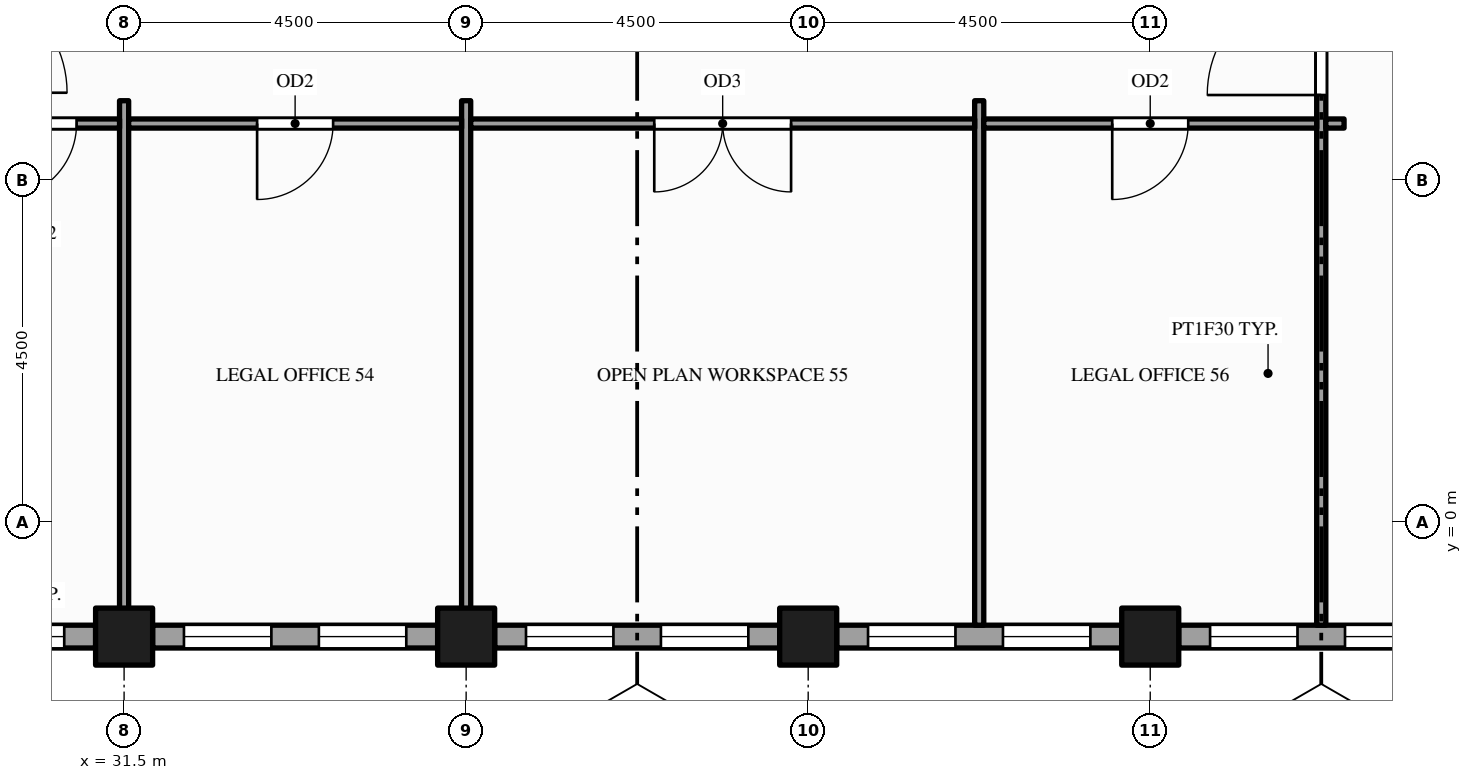
"""IFC4 building model, lengths in metres.
Left out: names, types, materials, properties, quantities, classifications, styles, units other than length and angle.
Written with IfcOpenShell. Run it as: python <this file> out.ifc"""

import sys

from ifc_helpers import new_model, si_unit, direction, frame, frame_2d, origin, origin_2d, place, context, subcontext, project, spatial, rectangle, hollow_rectangle, extrude, element, fill, save


model = new_model("IFC4")
c1 = context("Model", 3, precision=1e-05, world=origin(), true_north=direction((0.0, 1.0)))
c2 = subcontext(c1, "Body", "Model", "MODEL_VIEW")
j1 = project(units=[si_unit("LENGTHUNIT", "METRE"), si_unit("PLANEANGLEUNIT", "RADIAN")], contexts=[c1])
p1 = place(None, origin())
s1 = spatial("IfcSite", under=j1, at=p1, CompositionType="ELEMENT")
p2 = place(p1, origin())
s2 = spatial("IfcBuilding", under=s1, at=p2, CompositionType="ELEMENT")
p3 = place(p2, frame((0.0, 0.0, 211.0)))
s3 = spatial("IfcBuildingStorey", under=s2, at=p3, CompositionType="ELEMENT", Elevation=211.0)
for number, where, z_axis, x_axis in (
    (1, (31.5, -1.5, -0.15), (0.0, 0.0, 1.0), (1.0, 0.0, 0.0)),
    (2, (36.0, -1.5, -0.15), (0.0, 0.0, 1.0), (1.0, 0.0, 0.0)),
    (3, (40.5, -1.5, -0.15), (0.0, 0.0, 1.0), (1.0, 0.0, 0.0)),
    (4, (45.0, -1.5, -0.15), (0.0, 0.0, 1.0), (1.0, 0.0, 0.0)),
):
    element("IfcColumn", number, at=place(p3, frame(where, z_axis=z_axis, x_axis=x_axis)), inside=s3, PredefinedType="COLUMN", context=c2, shape_type="SweptSolid", body=[
        extrude(hollow_rectangle(XDim=0.75, YDim=0.75, WallThickness=0.036, at=origin_2d()), origin(), (0.0, 0.0, 1.0), 4.0),
    ])
p4 = place(p3, frame((27.375, -1.5, 0.0), z_axis=(0.0, 0.0, 1.0), x_axis=(1.0, 0.0, 0.0)))
e5 = element("IfcWall", 5, at=p4, inside=s3, PredefinedType="STANDARD", context=c2, shape_type="SweptSolid", body=[
    extrude(rectangle(XDim=3.75, YDim=0.3, at=frame_2d((1.875, 0.0))), origin(), (0.0, 0.0, 1.0), 2.87),
])
p5 = place(p4, frame((0.413, 0.0, 0.9)))
e6 = element("IfcOpeningElement", 6, at=p5, cuts=e5, PredefinedType="OPENING", context=c2, shape_type="SweptSolid", body=[
    extrude(rectangle(XDim=1.15, YDim=1.75, at=frame_2d((0.575, 0.875))), frame((0.0, 0.16, 0.0), z_axis=(0.0, -1.0, 0.0), x_axis=(1.0, 0.0, 0.0)), (0.0, 0.0, 1.0), 0.32),
])
p6 = place(p4, frame((2.188, 0.0, 0.9)))
e7 = element("IfcOpeningElement", 7, at=p6, cuts=e5, PredefinedType="OPENING", context=c2, shape_type="SweptSolid", body=[
    extrude(rectangle(XDim=1.15, YDim=1.75, at=frame_2d((0.575, 0.875))), frame((0.0, 0.16, 0.0), z_axis=(0.0, -1.0, 0.0), x_axis=(1.0, 0.0, 0.0)), (0.0, 0.0, 1.0), 0.32),
])
p7 = place(p3, frame((31.875, -1.5, 0.0), z_axis=(0.0, 0.0, 1.0), x_axis=(1.0, 0.0, 0.0)))
e8 = element("IfcWall", 8, at=p7, inside=s3, PredefinedType="STANDARD", context=c2, shape_type="SweptSolid", body=[
    extrude(rectangle(XDim=3.75, YDim=0.3, at=frame_2d((1.875, 0.0))), origin(), (0.0, 0.0, 1.0), 2.87),
])
p8 = place(p7, frame((0.413, 0.0, 0.9)))
e9 = element("IfcOpeningElement", 9, at=p8, cuts=e8, PredefinedType="OPENING", context=c2, shape_type="SweptSolid", body=[
    extrude(rectangle(XDim=1.15, YDim=1.75, at=frame_2d((0.575, 0.875))), frame((0.0, 0.16, 0.0), z_axis=(0.0, -1.0, 0.0), x_axis=(1.0, 0.0, 0.0)), (0.0, 0.0, 1.0), 0.32),
])
p9 = place(p7, frame((2.188, 0.0, 0.9)))
e10 = element("IfcOpeningElement", 10, at=p9, cuts=e8, PredefinedType="OPENING", context=c2, shape_type="SweptSolid", body=[
    extrude(rectangle(XDim=1.15, YDim=1.75, at=frame_2d((0.575, 0.875))), frame((0.0, 0.16, 0.0), z_axis=(0.0, -1.0, 0.0), x_axis=(1.0, 0.0, 0.0)), (0.0, 0.0, 1.0), 0.32),
])
p10 = place(p3, frame((36.375, -1.5, 0.0), z_axis=(0.0, 0.0, 1.0), x_axis=(1.0, 0.0, 0.0)))
e11 = element("IfcWall", 11, at=p10, inside=s3, PredefinedType="STANDARD", context=c2, shape_type="SweptSolid", body=[
    extrude(rectangle(XDim=3.75, YDim=0.3, at=frame_2d((1.875, 0.0))), origin(), (0.0, 0.0, 1.0), 2.87),
])
p11 = place(p10, frame((0.413, 0.0, 0.9)))
e12 = element("IfcOpeningElement", 12, at=p11, cuts=e11, PredefinedType="OPENING", context=c2, shape_type="SweptSolid", body=[
    extrude(rectangle(XDim=1.15, YDim=1.75, at=frame_2d((0.575, 0.875))), frame((0.0, 0.16, 0.0), z_axis=(0.0, -1.0, 0.0), x_axis=(1.0, 0.0, 0.0)), (0.0, 0.0, 1.0), 0.32),
])
p12 = place(p10, frame((2.188, 0.0, 0.9)))
e13 = element("IfcOpeningElement", 13, at=p12, cuts=e11, PredefinedType="OPENING", context=c2, shape_type="SweptSolid", body=[
    extrude(rectangle(XDim=1.15, YDim=1.75, at=frame_2d((0.575, 0.875))), frame((0.0, 0.16, 0.0), z_axis=(0.0, -1.0, 0.0), x_axis=(1.0, 0.0, 0.0)), (0.0, 0.0, 1.0), 0.32),
])
p13 = place(p3, frame((40.875, -1.5, 0.0), z_axis=(0.0, 0.0, 1.0), x_axis=(1.0, 0.0, 0.0)))
e14 = element("IfcWall", 14, at=p13, inside=s3, PredefinedType="STANDARD", context=c2, shape_type="SweptSolid", body=[
    extrude(rectangle(XDim=3.75, YDim=0.3, at=frame_2d((1.875, 0.0))), origin(), (0.0, 0.0, 1.0), 2.87),
])
p14 = place(p13, frame((0.413, 0.0, 0.9)))
e15 = element("IfcOpeningElement", 15, at=p14, cuts=e14, PredefinedType="OPENING", context=c2, shape_type="SweptSolid", body=[
    extrude(rectangle(XDim=1.15, YDim=1.75, at=frame_2d((0.575, 0.875))), frame((0.0, 0.16, 0.0), z_axis=(0.0, -1.0, 0.0), x_axis=(1.0, 0.0, 0.0)), (0.0, 0.0, 1.0), 0.32),
])
p15 = place(p13, frame((2.188, 0.0, 0.9)))
e16 = element("IfcOpeningElement", 16, at=p15, cuts=e14, PredefinedType="OPENING", context=c2, shape_type="SweptSolid", body=[
    extrude(rectangle(XDim=1.15, YDim=1.75, at=frame_2d((0.575, 0.875))), frame((0.0, 0.16, 0.0), z_axis=(0.0, -1.0, 0.0), x_axis=(1.0, 0.0, 0.0)), (0.0, 0.0, 1.0), 0.32),
])
p16 = place(p3, frame((45.375, -1.5, 0.0), z_axis=(0.0, 0.0, 1.0), x_axis=(1.0, 0.0, 0.0)))
e17 = element("IfcWall", 17, at=p16, inside=s3, PredefinedType="STANDARD", context=c2, shape_type="SweptSolid", body=[
    extrude(rectangle(XDim=3.75, YDim=0.3, at=frame_2d((1.875, 0.0))), origin(), (0.0, 0.0, 1.0), 2.87),
])
p17 = place(p16, frame((0.413, 0.0, 0.9)))
e18 = element("IfcOpeningElement", 18, at=p17, cuts=e17, PredefinedType="OPENING", context=c2, shape_type="SweptSolid", body=[
    extrude(rectangle(XDim=1.15, YDim=1.75, at=frame_2d((0.575, 0.875))), frame((0.0, 0.16, 0.0), z_axis=(0.0, -1.0, 0.0), x_axis=(1.0, 0.0, 0.0)), (0.0, 0.0, 1.0), 0.32),
])
p18 = place(p16, frame((2.188, 0.0, 0.9)))
e19 = element("IfcOpeningElement", 19, at=p18, cuts=e17, PredefinedType="OPENING", context=c2, shape_type="SweptSolid", body=[
    extrude(rectangle(XDim=1.15, YDim=1.75, at=frame_2d((0.575, 0.875))), frame((0.0, 0.16, 0.0), z_axis=(0.0, -1.0, 0.0), x_axis=(1.0, 0.0, 0.0)), (0.0, 0.0, 1.0), 0.32),
])
for number, where, z_axis, x_axis in (
    (20, (31.5, -1.35, 0.0), (0.0, 0.0, 1.0), (0.0, 1.0, 0.0)),
    (21, (36.0, -1.35, 0.0), (0.0, 0.0, 1.0), (0.0, 1.0, 0.0)),
    (22, (42.75, -1.35, 0.0), (0.0, 0.0, 1.0), (0.0, 1.0, 0.0)),
):
    element("IfcWall", number, at=place(p3, frame(where, z_axis=z_axis, x_axis=x_axis)), inside=s3, PredefinedType="PARTITIONING", context=c2, shape_type="SweptSolid", body=[
        extrude(rectangle(XDim=6.9, YDim=0.12, at=frame_2d((3.45, 0.0))), origin(), (0.0, 0.0, 1.0), 2.87),
    ])
p19 = place(p3, frame((47.25, -1.35, 0.0), z_axis=(0.0, 0.0, 1.0), x_axis=(0.0, 1.0, 0.0)))
e23 = element("IfcWall", 23, at=p19, inside=s3, PredefinedType="PARTITIONING", context=c2, shape_type="SweptSolid", body=[
    extrude(rectangle(XDim=22.2, YDim=0.12, at=frame_2d((11.1, 0.0))), origin(), (0.0, 0.0, 1.0), 2.87),
])
p20 = place(p19, frame((6.975, 0.0, 0.0)))
e24 = element("IfcOpeningElement", 24, at=p20, cuts=e23, PredefinedType="OPENING", context=c2, shape_type="SweptSolid", body=[
    extrude(rectangle(XDim=1.5, YDim=2.1, at=frame_2d((0.75, 1.05))), frame((0.0, 0.07, 0.0), z_axis=(0.0, -1.0, 0.0), x_axis=(1.0, 0.0, 0.0)), (0.0, 0.0, 1.0), 0.14),
])
p21 = place(p19, frame((13.725, 0.0, 0.0)))
e25 = element("IfcOpeningElement", 25, at=p21, cuts=e23, PredefinedType="OPENING", context=c2, shape_type="SweptSolid", body=[
    extrude(rectangle(XDim=1.5, YDim=2.1, at=frame_2d((0.75, 1.05))), frame((0.0, 0.07, 0.0), z_axis=(0.0, -1.0, 0.0), x_axis=(1.0, 0.0, 0.0)), (0.0, 0.0, 1.0), 0.14),
])
p22 = place(p19, frame((9.29, 0.0, 0.0)))
e26 = element("IfcOpeningElement", 26, at=p22, cuts=e23, PredefinedType="OPENING", context=c2, shape_type="SweptSolid", body=[
    extrude(rectangle(XDim=0.9, YDim=2.1, at=frame_2d((0.45, 1.05))), frame((0.0, 0.07, 0.0), z_axis=(0.0, -1.0, 0.0), x_axis=(1.0, 0.0, 0.0)), (0.0, 0.0, 1.0), 0.14),
])
p23 = place(p19, frame((10.65, 0.0, 0.0)))
e27 = element("IfcOpeningElement", 27, at=p23, cuts=e23, PredefinedType="OPENING", context=c2, shape_type="SweptSolid", body=[
    extrude(rectangle(XDim=0.9, YDim=2.1, at=frame_2d((0.45, 1.05))), frame((0.0, 0.07, 0.0), z_axis=(0.0, -1.0, 0.0), x_axis=(1.0, 0.0, 0.0)), (0.0, 0.0, 1.0), 0.14),
])
p24 = place(p19, frame((12.01, 0.0, 0.0)))
e28 = element("IfcOpeningElement", 28, at=p24, cuts=e23, PredefinedType="OPENING", context=c2, shape_type="SweptSolid", body=[
    extrude(rectangle(XDim=1.0, YDim=2.1, at=frame_2d((0.5, 1.05))), frame((0.0, 0.07, 0.0), z_axis=(0.0, -1.0, 0.0), x_axis=(1.0, 0.0, 0.0)), (0.0, 0.0, 1.0), 0.14),
])
p25 = place(p3, frame((29.31, 5.25, 0.0), z_axis=(0.0, 0.0, 1.0), x_axis=(1.0, 0.0, 0.0)))
e29 = element("IfcWall", 29, at=p25, inside=s3, PredefinedType="PARTITIONING", context=c2, shape_type="SweptSolid", body=[
    extrude(rectangle(XDim=2.13, YDim=0.12, at=frame_2d((1.065, 0.0))), origin(), (0.0, 0.0, 1.0), 2.87),
])
p26 = place(p25, frame((0.565, 0.0, 0.0)))
e30 = element("IfcOpeningElement", 30, at=p26, cuts=e29, PredefinedType="OPENING", context=c2, shape_type="SweptSolid", body=[
    extrude(rectangle(XDim=1.0, YDim=2.1, at=frame_2d((0.5, 1.05))), frame((0.0, 0.07, 0.0), z_axis=(0.0, -1.0, 0.0), x_axis=(1.0, 0.0, 0.0)), (0.0, 0.0, 1.0), 0.14),
])
p27 = place(p3, frame((31.56, 5.25, 0.0), z_axis=(0.0, 0.0, 1.0), x_axis=(1.0, 0.0, 0.0)))
e31 = element("IfcWall", 31, at=p27, inside=s3, PredefinedType="PARTITIONING", context=c2, shape_type="SweptSolid", body=[
    extrude(rectangle(XDim=4.38, YDim=0.12, at=frame_2d((2.19, 0.0))), origin(), (0.0, 0.0, 1.0), 2.87),
])
p28 = place(p27, frame((1.69, 0.0, 0.0)))
e32 = element("IfcOpeningElement", 32, at=p28, cuts=e31, PredefinedType="OPENING", context=c2, shape_type="SweptSolid", body=[
    extrude(rectangle(XDim=1.0, YDim=2.1, at=frame_2d((0.5, 1.05))), frame((0.0, 0.07, 0.0), z_axis=(0.0, -1.0, 0.0), x_axis=(1.0, 0.0, 0.0)), (0.0, 0.0, 1.0), 0.14),
])
p29 = place(p3, frame((36.06, 5.25, 0.0), z_axis=(0.0, 0.0, 1.0), x_axis=(1.0, 0.0, 0.0)))
e33 = element("IfcWall", 33, at=p29, inside=s3, PredefinedType="PARTITIONING", context=c2, shape_type="SweptSolid", body=[
    extrude(rectangle(XDim=6.63, YDim=0.12, at=frame_2d((3.315, 0.0))), origin(), (0.0, 0.0, 1.0), 2.87),
])
p30 = place(p29, frame((2.415, 0.0, 0.0)))
e34 = element("IfcOpeningElement", 34, at=p30, cuts=e33, PredefinedType="OPENING", context=c2, shape_type="SweptSolid", body=[
    extrude(rectangle(XDim=1.8, YDim=2.1, at=frame_2d((0.9, 1.05))), frame((0.0, 0.07, 0.0), z_axis=(0.0, -1.0, 0.0), x_axis=(1.0, 0.0, 0.0)), (0.0, 0.0, 1.0), 0.14),
])
p31 = place(p3, frame((42.81, 5.25, 0.0), z_axis=(0.0, 0.0, 1.0), x_axis=(1.0, 0.0, 0.0)))
e35 = element("IfcWall", 35, at=p31, inside=s3, PredefinedType="PARTITIONING", context=c2, shape_type="SweptSolid", body=[
    extrude(rectangle(XDim=4.38, YDim=0.12, at=frame_2d((2.19, 0.0))), origin(), (0.0, 0.0, 1.0), 2.87),
])
p32 = place(p31, frame((1.69, 0.0, 0.0)))
e36 = element("IfcOpeningElement", 36, at=p32, cuts=e35, PredefinedType="OPENING", context=c2, shape_type="SweptSolid", body=[
    extrude(rectangle(XDim=1.0, YDim=2.1, at=frame_2d((0.5, 1.05))), frame((0.0, 0.07, 0.0), z_axis=(0.0, -1.0, 0.0), x_axis=(1.0, 0.0, 0.0)), (0.0, 0.0, 1.0), 0.14),
])
p33 = place(p3, frame((47.31, 5.25, 0.0), z_axis=(0.0, 0.0, 1.0), x_axis=(1.0, 0.0, 0.0)))
e37 = element("IfcWall", 37, at=p33, inside=s3, PredefinedType="PARTITIONING", context=c2, shape_type="SweptSolid", body=[
    extrude(rectangle(XDim=0.24, YDim=0.12, at=frame_2d((0.12, 0.0))), origin(), (0.0, 0.0, 1.0), 2.87),
])
p34 = place(p6, origin())
e38 = element("IfcWindow", 38, at=p34, inside=s3, PartitioningType="SINGLE_PANEL", PredefinedType="WINDOW", context=c2, shape_type="SweptSolid", body=[
    extrude(rectangle(XDim=1.15, YDim=1.75, at=frame_2d((0.575, 0.875))), frame((0.0, 0.03, 0.0), z_axis=(0.0, -1.0, 0.0), x_axis=(1.0, 0.0, 0.0)), (0.0, 0.0, 1.0), 0.06),
])
fill(e7, e38)
p35 = place(p8, origin())
e39 = element("IfcWindow", 39, at=p35, inside=s3, PartitioningType="SINGLE_PANEL", PredefinedType="WINDOW", context=c2, shape_type="SweptSolid", body=[
    extrude(rectangle(XDim=1.15, YDim=1.75, at=frame_2d((0.575, 0.875))), frame((0.0, 0.03, 0.0), z_axis=(0.0, -1.0, 0.0), x_axis=(1.0, 0.0, 0.0)), (0.0, 0.0, 1.0), 0.06),
])
fill(e9, e39)
p36 = place(p9, origin())
e40 = element("IfcWindow", 40, at=p36, inside=s3, PartitioningType="SINGLE_PANEL", PredefinedType="WINDOW", context=c2, shape_type="SweptSolid", body=[
    extrude(rectangle(XDim=1.15, YDim=1.75, at=frame_2d((0.575, 0.875))), frame((0.0, 0.03, 0.0), z_axis=(0.0, -1.0, 0.0), x_axis=(1.0, 0.0, 0.0)), (0.0, 0.0, 1.0), 0.06),
])
fill(e10, e40)
p37 = place(p11, origin())
e41 = element("IfcWindow", 41, at=p37, inside=s3, PartitioningType="SINGLE_PANEL", PredefinedType="WINDOW", context=c2, shape_type="SweptSolid", body=[
    extrude(rectangle(XDim=1.15, YDim=1.75, at=frame_2d((0.575, 0.875))), frame((0.0, 0.03, 0.0), z_axis=(0.0, -1.0, 0.0), x_axis=(1.0, 0.0, 0.0)), (0.0, 0.0, 1.0), 0.06),
])
fill(e12, e41)
p38 = place(p12, origin())
e42 = element("IfcWindow", 42, at=p38, inside=s3, PartitioningType="SINGLE_PANEL", PredefinedType="WINDOW", context=c2, shape_type="SweptSolid", body=[
    extrude(rectangle(XDim=1.15, YDim=1.75, at=frame_2d((0.575, 0.875))), frame((0.0, 0.03, 0.0), z_axis=(0.0, -1.0, 0.0), x_axis=(1.0, 0.0, 0.0)), (0.0, 0.0, 1.0), 0.06),
])
fill(e13, e42)
p39 = place(p14, origin())
e43 = element("IfcWindow", 43, at=p39, inside=s3, PartitioningType="SINGLE_PANEL", PredefinedType="WINDOW", context=c2, shape_type="SweptSolid", body=[
    extrude(rectangle(XDim=1.15, YDim=1.75, at=frame_2d((0.575, 0.875))), frame((0.0, 0.03, 0.0), z_axis=(0.0, -1.0, 0.0), x_axis=(1.0, 0.0, 0.0)), (0.0, 0.0, 1.0), 0.06),
])
fill(e15, e43)
p40 = place(p15, origin())
e44 = element("IfcWindow", 44, at=p40, inside=s3, PartitioningType="SINGLE_PANEL", PredefinedType="WINDOW", context=c2, shape_type="SweptSolid", body=[
    extrude(rectangle(XDim=1.15, YDim=1.75, at=frame_2d((0.575, 0.875))), frame((0.0, 0.03, 0.0), z_axis=(0.0, -1.0, 0.0), x_axis=(1.0, 0.0, 0.0)), (0.0, 0.0, 1.0), 0.06),
])
fill(e16, e44)
p41 = place(p17, origin())
e45 = element("IfcWindow", 45, at=p41, inside=s3, PartitioningType="SINGLE_PANEL", PredefinedType="WINDOW", context=c2, shape_type="SweptSolid", body=[
    extrude(rectangle(XDim=1.15, YDim=1.75, at=frame_2d((0.575, 0.875))), frame((0.0, 0.03, 0.0), z_axis=(0.0, -1.0, 0.0), x_axis=(1.0, 0.0, 0.0)), (0.0, 0.0, 1.0), 0.06),
])
fill(e18, e45)
p42 = place(p18, origin())
e46 = element("IfcWindow", 46, at=p42, inside=s3, PartitioningType="SINGLE_PANEL", PredefinedType="WINDOW", context=c2, shape_type="SweptSolid", body=[
    extrude(rectangle(XDim=1.15, YDim=1.75, at=frame_2d((0.575, 0.875))), frame((0.0, 0.03, 0.0), z_axis=(0.0, -1.0, 0.0), x_axis=(1.0, 0.0, 0.0)), (0.0, 0.0, 1.0), 0.06),
])
fill(e19, e46)
p43 = place(p20, origin())
e47 = element("IfcDoor", 47, at=p43, inside=s3, OperationType="SINGLE_SWING_LEFT", PredefinedType="DOOR", context=c2, shape_type="SweptSolid", body=[
    extrude(rectangle(XDim=1.5, YDim=2.1, at=frame_2d((0.75, 1.05))), frame((0.0, 0.025, 0.0), z_axis=(0.0, -1.0, 0.0), x_axis=(1.0, 0.0, 0.0)), (0.0, 0.0, 1.0), 0.05),
])
fill(e24, e47)
p44 = place(p26, origin())
e48 = element("IfcDoor", 48, at=p44, inside=s3, OperationType="SINGLE_SWING_LEFT", PredefinedType="DOOR", context=c2, shape_type="SweptSolid", body=[
    extrude(rectangle(XDim=1.0, YDim=2.1, at=frame_2d((0.5, 1.05))), frame((0.0, 0.025, 0.0), z_axis=(0.0, -1.0, 0.0), x_axis=(1.0, 0.0, 0.0)), (0.0, 0.0, 1.0), 0.05),
])
fill(e30, e48)
p45 = place(p28, origin())
e49 = element("IfcDoor", 49, at=p45, inside=s3, OperationType="SINGLE_SWING_LEFT", PredefinedType="DOOR", context=c2, shape_type="SweptSolid", body=[
    extrude(rectangle(XDim=1.0, YDim=2.1, at=frame_2d((0.5, 1.05))), frame((0.0, 0.025, 0.0), z_axis=(0.0, -1.0, 0.0), x_axis=(1.0, 0.0, 0.0)), (0.0, 0.0, 1.0), 0.05),
])
fill(e32, e49)
p46 = place(p30, origin())
e50 = element("IfcDoor", 50, at=p46, inside=s3, OperationType="DOUBLE_DOOR_SINGLE_SWING", PredefinedType="DOOR", context=c2, shape_type="SweptSolid", body=[
    extrude(rectangle(XDim=1.8, YDim=2.1, at=frame_2d((0.9, 1.05))), frame((0.0, 0.025, 0.0), z_axis=(0.0, -1.0, 0.0), x_axis=(1.0, 0.0, 0.0)), (0.0, 0.0, 1.0), 0.05),
])
fill(e34, e50)
p47 = place(p32, origin())
e51 = element("IfcDoor", 51, at=p47, inside=s3, OperationType="SINGLE_SWING_LEFT", PredefinedType="DOOR", context=c2, shape_type="SweptSolid", body=[
    extrude(rectangle(XDim=1.0, YDim=2.1, at=frame_2d((0.5, 1.05))), frame((0.0, 0.025, 0.0), z_axis=(0.0, -1.0, 0.0), x_axis=(1.0, 0.0, 0.0)), (0.0, 0.0, 1.0), 0.05),
])
fill(e36, e51)
save(model, sys.argv[1])
